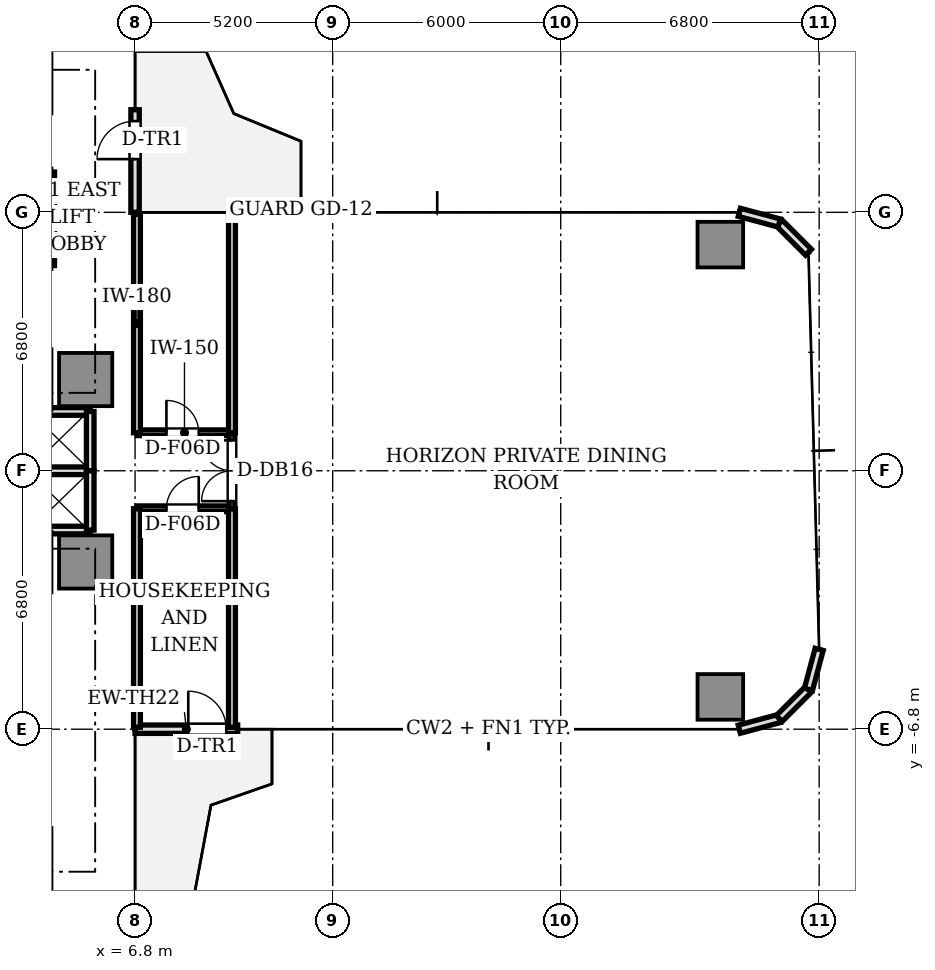
"""IFC4 building model, lengths in metres.
Left out: names, types, materials, properties, quantities, classifications, styles, units other than length and angle.
Written with IfcOpenShell. Run it as: python <this file> out.ifc"""

import sys

from ifc_helpers import new_model, si_unit, direction, frame, frame_2d, origin, origin_2d, place, context, subcontext, project, spatial, rectangle, extrude, source, transform, mapped, element, fill, save


model = new_model("IFC4")
c1 = context("Model", 3, precision=1e-05, world=origin(), true_north=direction((0.0, 1.0)))
c2 = subcontext(c1, "Body", "Model", "MODEL_VIEW")
j1 = project(units=[si_unit("LENGTHUNIT", "METRE"), si_unit("PLANEANGLEUNIT", "RADIAN")], contexts=[c1])
p1 = place(None, origin())
s1 = spatial("IfcSite", under=j1, at=p1, CompositionType="ELEMENT")
p2 = place(p1, origin())
s2 = spatial("IfcBuilding", under=s1, at=p2, CompositionType="ELEMENT")
p3 = place(p2, frame((0.0, 0.0, 43.2)))
s3 = spatial("IfcBuildingStorey", under=s2, at=p3, CompositionType="ELEMENT", Elevation=43.2)
m1 = source(origin(), c2, "Body", "SweptSolid", [
    extrude(rectangle(XDim=1.4, YDim=1.4, at=origin_2d()), origin(), (0.0, 0.0, 1.0), 3.05),
])
for number, where, z_axis, x_axis in (
    (1, (5.5, 2.4, 0.0), (0.0, 0.0, 1.0), (1.0, 0.0, 0.0)),
    (2, (5.5, -2.4, 0.0), (0.0, 0.0, 1.0), (1.0, 0.0, 0.0)),
):
    element("IfcColumn", number, at=place(p3, frame(where, z_axis=z_axis, x_axis=x_axis)), inside=s3, PredefinedType="COLUMN", context=c2, shape_type="MappedRepresentation", body=[
        mapped(m1, transform((0.0, 0.0, 0.0), scale=1.0)),
    ])
m2 = source(origin(), c2, "Body", "SweptSolid", [
    extrude(rectangle(XDim=1.2, YDim=1.2, at=origin_2d()), origin(), (0.0, 0.0, 1.0), 3.05),
])
for number, where, z_axis, x_axis in (
    (3, (22.2, -5.95, 0.0), (0.0, 0.0, 1.0), (1.0, 0.0, 0.0)),
    (4, (22.2, 5.95, 0.0), (0.0, 0.0, 1.0), (1.0, 0.0, 0.0)),
):
    element("IfcColumn", number, at=place(p3, frame(where, z_axis=z_axis, x_axis=x_axis)), inside=s3, PredefinedType="COLUMN", context=c2, shape_type="MappedRepresentation", body=[
        mapped(m2, transform((0.0, 0.0, 0.0), scale=1.0)),
    ])
p4 = place(p3, frame((6.8, -6.8, 0.0), z_axis=(0.0, 0.0, 1.0), x_axis=(1.0, 0.0, 0.0)))
e5 = element("IfcWall", 5, at=p4, inside=s3, PredefinedType="STANDARD", context=c2, shape_type="SweptSolid", body=[
    extrude(rectangle(XDim=2.7, YDim=0.22, at=frame_2d((1.35, 0.0))), origin(), (0.0, 0.0, 1.0), 3.05),
])
p5 = place(p4, frame((1.4, 0.0, 0.0)))
e6 = element("IfcOpeningElement", 6, at=p5, cuts=e5, PredefinedType="OPENING", context=c2, shape_type="SweptSolid", body=[
    extrude(rectangle(XDim=1.0, YDim=2.2, at=frame_2d((0.5, 1.1))), frame((0.0, 0.12, 0.0), z_axis=(0.0, -1.0, 0.0), x_axis=(1.0, 0.0, 0.0)), (0.0, 0.0, 1.0), 0.24),
])
for number, where, z_axis, x_axis in (
    (7, (22.7, -6.8, 0.0), (0.0, 0.0, 1.0), (0.966, 0.259, 0.0)),
    (8, (23.75, -6.519, 0.0), (0.0, 0.0, 1.0), (0.707, 0.707, 0.0)),
    (9, (24.519, -5.75, 0.0), (0.0, 0.0, 1.0), (0.259, 0.966, 0.0)),
    (10, (24.519, 5.75, 0.0), (0.0, 0.0, 1.0), (-0.707, 0.707, 0.0)),
    (11, (23.75, 6.519, 0.0), (0.0, 0.0, 1.0), (-0.966, 0.259, 0.0)),
):
    element("IfcWall", number, at=place(p3, frame(where, z_axis=z_axis, x_axis=x_axis)), inside=s3, PredefinedType="STANDARD", context=c2, shape_type="SweptSolid", body=[
        extrude(rectangle(XDim=1.087, YDim=0.22, at=frame_2d((0.543, 0.0))), origin(), (0.0, 0.0, 1.0), 3.05),
    ])
p6 = place(p3, frame((6.8, 6.8, 0.0), z_axis=(0.0, 0.0, 1.0), x_axis=(0.0, 1.0, 0.0)))
e12 = element("IfcWall", 12, at=p6, inside=s3, PredefinedType="STANDARD", context=c2, shape_type="SweptSolid", body=[
    extrude(rectangle(XDim=2.7, YDim=0.22, at=frame_2d((1.35, 0.0))), origin(), (0.0, 0.0, 1.0), 3.05),
])
p7 = place(p6, frame((1.4, 0.0, 0.0)))
e13 = element("IfcOpeningElement", 13, at=p7, cuts=e12, PredefinedType="OPENING", context=c2, shape_type="SweptSolid", body=[
    extrude(rectangle(XDim=1.0, YDim=2.2, at=frame_2d((0.5, 1.1))), frame((0.0, 0.12, 0.0), z_axis=(0.0, -1.0, 0.0), x_axis=(1.0, 0.0, 0.0)), (0.0, 0.0, 1.0), 0.24),
])
for number, where, z_axis, x_axis in (
    (14, (3.98, 1.56, 0.0), (0.0, 0.0, 1.0), (1.0, 0.0, 0.0)),
    (15, (3.98, -1.56, 0.0), (0.0, 0.0, 1.0), (1.0, 0.0, 0.0)),
    (16, (3.98, 0.0, 0.0), (0.0, 0.0, 1.0), (1.0, 0.0, 0.0)),
):
    element("IfcWall", number, at=place(p3, frame(where, z_axis=z_axis, x_axis=x_axis)), inside=s3, PredefinedType="SOLIDWALL", context=c2, shape_type="SweptSolid", body=[
        extrude(rectangle(XDim=1.64, YDim=0.2, at=frame_2d((0.82, 0.0))), origin(), (0.0, 0.0, 1.0), 2.6),
    ])
for number, where, z_axis, x_axis in (
    (17, (5.62, 0.0, 0.0), (0.0, 0.0, 1.0), (0.0, 1.0, 0.0)),
    (18, (5.62, -1.56, 0.0), (0.0, 0.0, 1.0), (0.0, 1.0, 0.0)),
):
    element("IfcWall", number, at=place(p3, frame(where, z_axis=z_axis, x_axis=x_axis)), inside=s3, PredefinedType="SOLIDWALL", context=c2, shape_type="SweptSolid", body=[
        extrude(rectangle(XDim=1.56, YDim=0.2, at=frame_2d((0.78, 0.0))), origin(), (0.0, 0.0, 1.0), 2.6),
    ])
p8 = place(p3, frame((4.58, 5.4, 0.0), z_axis=(0.0, 0.0, 1.0), x_axis=(0.0, 1.0, 0.0)))
e19 = element("IfcWall", 19, at=p8, inside=s3, PredefinedType="SOLIDWALL", context=c2, shape_type="SweptSolid", body=[
    extrude(rectangle(XDim=2.46, YDim=0.2, at=frame_2d((1.23, 0.0))), origin(), (0.0, 0.0, 1.0), 2.6),
])
p9 = place(p8, frame((0.2, 0.0, 0.0)))
e20 = element("IfcOpeningElement", 20, at=p9, cuts=e19, PredefinedType="OPENING", context=c2, shape_type="SweptSolid", body=[
    extrude(rectangle(XDim=0.85, YDim=2.1, at=frame_2d((0.425, 1.05))), frame((0.0, 0.11, 0.0), z_axis=(0.0, -1.0, 0.0), x_axis=(1.0, 0.0, 0.0)), (0.0, 0.0, 1.0), 0.22),
])
p10 = place(p8, frame((1.38, 0.0, 0.0)))
e21 = element("IfcOpeningElement", 21, at=p10, cuts=e19, PredefinedType="OPENING", context=c2, shape_type="SweptSolid", body=[
    extrude(rectangle(XDim=0.85, YDim=2.1, at=frame_2d((0.425, 1.05))), frame((0.0, 0.11, 0.0), z_axis=(0.0, -1.0, 0.0), x_axis=(1.0, 0.0, 0.0)), (0.0, 0.0, 1.0), 0.22),
])
p11 = place(p3, frame((6.85, 1.0, 0.0), z_axis=(0.0, 0.0, 1.0), x_axis=(1.0, 0.0, 0.0)))
e22 = element("IfcWall", 22, at=p11, inside=s3, PredefinedType="PARTITIONING", context=c2, shape_type="SweptSolid", body=[
    extrude(rectangle(XDim=2.5, YDim=0.15, at=frame_2d((1.25, 0.0))), origin(), (0.0, 0.0, 1.0), 2.6),
])
p12 = place(p11, frame((0.775, 0.0, 0.0)))
e23 = element("IfcOpeningElement", 23, at=p12, cuts=e22, PredefinedType="OPENING", context=c2, shape_type="SweptSolid", body=[
    extrude(rectangle(XDim=0.85, YDim=2.1, at=frame_2d((0.425, 1.05))), frame((0.0, 0.085, 0.0), z_axis=(0.0, -1.0, 0.0), x_axis=(1.0, 0.0, 0.0)), (0.0, 0.0, 1.0), 0.17),
])
p13 = place(p3, frame((6.85, -1.0, 0.0), z_axis=(0.0, 0.0, 1.0), x_axis=(1.0, 0.0, 0.0)))
e24 = element("IfcWall", 24, at=p13, inside=s3, PredefinedType="PARTITIONING", context=c2, shape_type="SweptSolid", body=[
    extrude(rectangle(XDim=2.5, YDim=0.15, at=frame_2d((1.25, 0.0))), origin(), (0.0, 0.0, 1.0), 2.6),
])
p14 = place(p13, frame((0.775, 0.0, 0.0)))
e25 = element("IfcOpeningElement", 25, at=p14, cuts=e24, PredefinedType="OPENING", context=c2, shape_type="SweptSolid", body=[
    extrude(rectangle(XDim=0.85, YDim=2.1, at=frame_2d((0.425, 1.05))), frame((0.0, 0.085, 0.0), z_axis=(0.0, -1.0, 0.0), x_axis=(1.0, 0.0, 0.0)), (0.0, 0.0, 1.0), 0.17),
])
for number, where, z_axis, x_axis in (
    (26, (6.85, 1.0, 0.0), (0.0, 0.0, 1.0), (0.0, 1.0, 0.0)),
    (27, (6.85, -6.75, 0.0), (0.0, 0.0, 1.0), (0.0, 1.0, 0.0)),
    (28, (9.35, -1.0, 0.0), (0.0, 0.0, 1.0), (0.0, -1.0, 0.0)),
    (29, (9.35, 1.0, 0.0), (0.0, 0.0, 1.0), (0.0, 1.0, 0.0)),
):
    element("IfcWall", number, at=place(p3, frame(where, z_axis=z_axis, x_axis=x_axis)), inside=s3, PredefinedType="PARTITIONING", context=c2, shape_type="SweptSolid", body=[
        extrude(rectangle(XDim=5.75, YDim=0.18, at=frame_2d((2.875, 0.0))), origin(), (0.0, 0.0, 1.0), 2.6),
    ])
p15 = place(p3, frame((9.35, -1.0, 0.0), z_axis=(0.0, 0.0, 1.0), x_axis=(0.0, 1.0, 0.0)))
e30 = element("IfcWall", 30, at=p15, inside=s3, PredefinedType="PARTITIONING", context=c2, shape_type="SweptSolid", body=[
    extrude(rectangle(XDim=2.0, YDim=0.15, at=frame_2d((1.0, 0.0))), origin(), (0.0, 0.0, 1.0), 2.6),
])
p16 = place(p15, frame((0.2, 0.0, 0.0)))
e31 = element("IfcOpeningElement", 31, at=p16, cuts=e30, PredefinedType="OPENING", context=c2, shape_type="SweptSolid", body=[
    extrude(rectangle(XDim=1.6, YDim=2.25, at=frame_2d((0.8, 1.125))), frame((0.0, 0.085, 0.0), z_axis=(0.0, -1.0, 0.0), x_axis=(1.0, 0.0, 0.0)), (0.0, 0.0, 1.0), 0.17),
])
m3 = source(origin(), c2, "Body", "SweptSolid", [
    extrude(rectangle(XDim=1.0, YDim=0.05, at=origin_2d()), origin(), (0.0, 0.0, 1.0), 2.2),
])
p17 = place(p5, frame((0.5, 0.0, 0.0)))
e32 = element("IfcDoor", 32, at=p17, inside=s3, OperationType="SINGLE_SWING_LEFT", PredefinedType="DOOR", context=c2, shape_type="MappedRepresentation", body=[
    mapped(m3, transform((0.0, 0.0, 0.0), scale=1.0)),
])
fill(e6, e32)
p18 = place(p7, frame((0.5, 0.0, 0.0)))
e33 = element("IfcDoor", 33, at=p18, inside=s3, OperationType="SINGLE_SWING_LEFT", PredefinedType="DOOR", context=c2, shape_type="MappedRepresentation", body=[
    mapped(m3, transform((0.0, 0.0, 0.0), scale=1.0)),
])
fill(e13, e33)
m4 = source(origin(), c2, "Body", "SweptSolid", [
    extrude(rectangle(XDim=0.85, YDim=0.05, at=origin_2d()), origin(), (0.0, 0.0, 1.0), 2.1),
])
p19 = place(p14, frame((0.425, 0.0, 0.0)))
e34 = element("IfcDoor", 34, at=p19, inside=s3, OperationType="SINGLE_SWING_RIGHT", PredefinedType="DOOR", context=c2, shape_type="MappedRepresentation", body=[
    mapped(m4, transform((0.0, 0.0, 0.0), scale=1.0)),
])
fill(e25, e34)
p20 = place(p12, frame((0.425, 0.0, 0.0)))
e35 = element("IfcDoor", 35, at=p20, inside=s3, OperationType="SINGLE_SWING_LEFT", PredefinedType="DOOR", context=c2, shape_type="MappedRepresentation", body=[
    mapped(m4, transform((0.0, 0.0, 0.0), scale=1.0)),
])
fill(e23, e35)
m5 = source(origin(), c2, "Body", "SweptSolid", [
    extrude(rectangle(XDim=1.6, YDim=0.05, at=origin_2d()), origin(), (0.0, 0.0, 1.0), 2.25),
])
p21 = place(p16, frame((0.8, 0.0, 0.0)))
e36 = element("IfcDoor", 36, at=p21, inside=s3, OperationType="DOUBLE_DOOR_SINGLE_SWING", PredefinedType="DOOR", context=c2, shape_type="MappedRepresentation", body=[
    mapped(m5, transform((0.0, 0.0, 0.0), scale=1.0)),
])
fill(e31, e36)
save(model, sys.argv[1])
